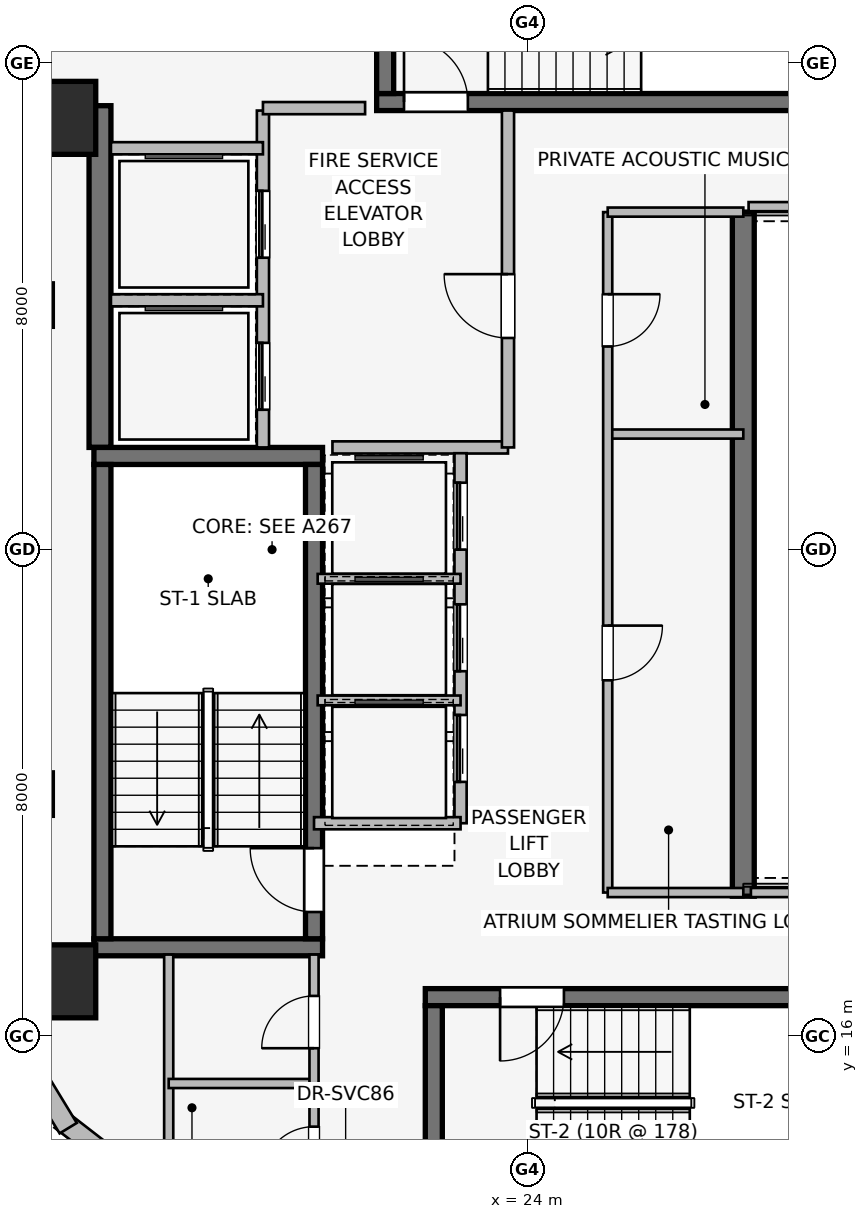
"""IFC4 building model, lengths in metres.
Left out: names, types, materials, properties, quantities, classifications, styles, units other than length and angle.
Written with IfcOpenShell. Run it as: python <this file> out.ifc"""

import sys

from ifc_helpers import new_model, si_unit, direction, frame, frame_2d, origin, origin_2d, place, context, subcontext, project, spatial, rectangle, extrude, element, fill, save


model = new_model("IFC4")
c1 = context("Model", 3, precision=1e-05, world=origin(), true_north=direction((0.0, 1.0)))
c2 = subcontext(c1, "Body", "Model", "MODEL_VIEW")
j1 = project(units=[si_unit("LENGTHUNIT", "METRE"), si_unit("PLANEANGLEUNIT", "RADIAN")], contexts=[c1])
p1 = place(None, origin())
s1 = spatial("IfcSite", under=j1, at=p1, CompositionType="ELEMENT")
p2 = place(p1, origin())
s2 = spatial("IfcBuilding", under=s1, at=p2, CompositionType="ELEMENT")
p3 = place(p2, frame((0.0, 0.0, 238.35)))
s3 = spatial("IfcBuildingStorey", under=s2, at=p3, CompositionType="ELEMENT", Elevation=238.35)
p4 = place(p3, frame((16.97, 25.68, 0.0), z_axis=(0.0, 0.0, 1.0), x_axis=(0.0, 1.0, 0.0)))
e1 = element("IfcWall", 1, at=p4, inside=s3, PredefinedType="SHEAR", context=c2, shape_type="SweptSolid", body=[
    extrude(rectangle(XDim=5.62, YDim=0.36, at=frame_2d((2.81, 0.0))), origin(), (0.0, 0.0, 1.0), 3.55),
])
p5 = place(p3, frame((27.55, 29.55, 0.0), z_axis=(0.0, 0.0, 1.0), x_axis=(0.0, -1.0, 0.0)))
e2 = element("IfcWall", 2, at=p5, inside=s3, PredefinedType="SHEAR", context=c2, shape_type="SweptSolid", body=[
    extrude(rectangle(XDim=11.25, YDim=0.36, at=frame_2d((5.625, 0.0))), origin(), (0.0, 0.0, 1.0), 3.55),
])
for number, where, z_axis, x_axis in (
    (3, (16.87, 17.46, 0.0), (0.0, 0.0, 1.0), (1.0, 0.0, 0.0)),
    (4, (20.63, 25.54, 0.0), (0.0, 0.0, 1.0), (-1.0, 0.0, 0.0)),
):
    element("IfcWall", number, at=place(p3, frame(where, z_axis=z_axis, x_axis=x_axis)), inside=s3, PredefinedType="SHEAR", context=c2, shape_type="SweptSolid", body=[
        extrude(rectangle(XDim=3.76, YDim=0.28, at=frame_2d((1.88, 0.0))), origin(), (0.0, 0.0, 1.0), 3.55),
    ])
p6 = place(p3, frame((17.01, 25.4, 0.0), z_axis=(0.0, 0.0, 1.0), x_axis=(0.0, -1.0, 0.0)))
e5 = element("IfcWall", 5, at=p6, inside=s3, PredefinedType="SHEAR", context=c2, shape_type="SweptSolid", body=[
    extrude(rectangle(XDim=7.8, YDim=0.28, at=frame_2d((3.9, 0.0))), origin(), (0.0, 0.0, 1.0), 3.55),
])
p7 = place(p3, frame((20.49, 17.6, 0.0), z_axis=(0.0, 0.0, 1.0), x_axis=(0.0, 1.0, 0.0)))
e6 = element("IfcWall", 6, at=p7, inside=s3, PredefinedType="SHEAR", context=c2, shape_type="SweptSolid", body=[
    extrude(rectangle(XDim=7.8, YDim=0.28, at=frame_2d((3.9, 0.0))), origin(), (0.0, 0.0, 1.0), 3.55),
])
p8 = place(p7, frame((0.44, 0.0, 0.0)))
e7 = element("IfcOpeningElement", 7, at=p8, cuts=e6, PredefinedType="OPENING", context=c2, shape_type="SweptSolid", body=[
    extrude(rectangle(XDim=1.05, YDim=2.0, at=frame_2d((0.525, 1.0))), frame((0.0, 0.15, 0.0), z_axis=(0.0, -1.0, 0.0), x_axis=(1.0, 0.0, 0.0)), (0.0, 0.0, 1.0), 0.3),
])
p9 = place(p3, frame((30.68, 16.64, 0.0), z_axis=(0.0, 0.0, 1.0), x_axis=(-1.0, 0.0, 0.0)))
e8 = element("IfcWall", 8, at=p9, inside=s3, PredefinedType="SHEAR", context=c2, shape_type="SweptSolid", body=[
    extrude(rectangle(XDim=8.36, YDim=0.28, at=frame_2d((4.18, 0.0))), origin(), (0.0, 0.0, 1.0), 3.55),
])
p10 = place(p9, frame((6.08, 0.0, 0.0)))
e9 = element("IfcOpeningElement", 9, at=p10, cuts=e8, PredefinedType="OPENING", context=c2, shape_type="SweptSolid", body=[
    extrude(rectangle(XDim=1.05, YDim=2.0, at=frame_2d((0.525, 1.0))), frame((0.0, 0.15, 0.0), z_axis=(0.0, -1.0, 0.0), x_axis=(1.0, 0.0, 0.0)), (0.0, 0.0, 1.0), 0.3),
])
p11 = place(p3, frame((22.46, 16.5, 0.0), z_axis=(0.0, 0.0, 1.0), x_axis=(0.0, -1.0, 0.0)))
e10 = element("IfcWall", 10, at=p11, inside=s3, PredefinedType="SHEAR", context=c2, shape_type="SweptSolid", body=[
    extrude(rectangle(XDim=3.2, YDim=0.28, at=frame_2d((1.6, 0.0))), origin(), (0.0, 0.0, 1.0), 3.55),
])
p12 = place(p3, frame((21.52, 31.36, 0.0), z_axis=(0.0, 0.0, 1.0), x_axis=(1.0, 0.0, 0.0)))
e11 = element("IfcWall", 11, at=p12, inside=s3, PredefinedType="SHEAR", context=c2, shape_type="SweptSolid", body=[
    extrude(rectangle(XDim=8.36, YDim=0.28, at=frame_2d((4.18, 0.0))), origin(), (0.0, 0.0, 1.0), 3.55),
])
p13 = place(p12, frame((0.45, 0.0, 0.0)))
e12 = element("IfcOpeningElement", 12, at=p13, cuts=e11, PredefinedType="OPENING", context=c2, shape_type="SweptSolid", body=[
    extrude(rectangle(XDim=1.05, YDim=2.0, at=frame_2d((0.525, 1.0))), frame((0.0, 0.15, 0.0), z_axis=(0.0, -1.0, 0.0), x_axis=(1.0, 0.0, 0.0)), (0.0, 0.0, 1.0), 0.3),
])
p14 = place(p3, frame((21.66, 34.7, 0.0), z_axis=(0.0, 0.0, 1.0), x_axis=(0.0, -1.0, 0.0)))
e13 = element("IfcWall", 13, at=p14, inside=s3, PredefinedType="SHEAR", context=c2, shape_type="SweptSolid", body=[
    extrude(rectangle(XDim=3.2, YDim=0.28, at=frame_2d((1.6, 0.0))), origin(), (0.0, 0.0, 1.0), 3.55),
])
for number, where, z_axis, x_axis in (
    (14, (16.3, 16.9, 0.0), (0.0, 0.0, 1.0), (1.0, 0.0, 0.0)),
    (15, (16.3, 31.1, 0.0), (0.0, 0.0, 1.0), (1.0, 0.0, 0.0)),
):
    element("IfcColumn", number, at=place(p3, frame(where, z_axis=z_axis, x_axis=x_axis)), inside=s3, PredefinedType="COLUMN", context=c2, shape_type="SweptSolid", body=[
        extrude(rectangle(XDim=1.2, YDim=1.2, at=origin_2d()), origin(), (0.0, 0.0, 1.0), 3.55),
    ])
p15 = place(p3, frame((15.574, 32.082, 0.0), z_axis=(0.0, 0.0, 1.0), x_axis=(0.520325409202, 0.853968072318, 0.0)))
e16 = element("IfcWall", 16, at=p15, inside=s3, PredefinedType="STANDARD", context=c2, shape_type="SweptSolid", body=[
    extrude(rectangle(XDim=1.678, YDim=0.33, at=frame_2d((0.839, 0.0))), origin(), (0.0, 0.0, 1.0), 3.26),
])
p16 = place(p3, frame((17.647, 13.599, 0.0), z_axis=(0.0, 0.0, 1.0), x_axis=(-0.790691856293, 0.61221433207, 0.0)))
e17 = element("IfcWall", 17, at=p16, inside=s3, PredefinedType="STANDARD", context=c2, shape_type="SweptSolid", body=[
    extrude(rectangle(XDim=1.676, YDim=0.33, at=frame_2d((0.838, 0.0))), origin(), (0.0, 0.0, 1.0), 3.26),
])
p17 = place(p3, frame((16.447, 14.485, 0.0), z_axis=(0.0, 0.0, 1.0), x_axis=(-0.520325409202, 0.853968072318, 0.0)))
e18 = element("IfcWall", 18, at=p17, inside=s3, PredefinedType="STANDARD", context=c2, shape_type="SweptSolid", body=[
    extrude(rectangle(XDim=1.678, YDim=0.33, at=frame_2d((0.839, 0.0))), origin(), (0.0, 0.0, 1.0), 3.26),
])
p18 = place(p3, frame((19.65, 25.68, 0.0), z_axis=(0.0, 0.0, 1.0), x_axis=(0.0, 1.0, 0.0)))
e19 = element("IfcWall", 19, at=p18, inside=s3, PredefinedType="PARTITIONING", context=c2, shape_type="SweptSolid", body=[
    extrude(rectangle(XDim=5.54, YDim=0.2, at=frame_2d((2.77, 0.0))), origin(), (0.0, 0.0, 1.0), 3.26),
])
p19 = place(p18, frame((0.62, 0.0, 0.0)))
e20 = element("IfcOpeningElement", 20, at=p19, cuts=e19, PredefinedType="OPENING", context=c2, shape_type="SweptSolid", body=[
    extrude(rectangle(XDim=1.1, YDim=2.2, at=frame_2d((0.55, 1.1))), frame((0.0, 0.11, 0.0), z_axis=(0.0, -1.0, 0.0), x_axis=(1.0, 0.0, 0.0)), (0.0, 0.0, 1.0), 0.22),
])
p20 = place(p18, frame((3.12, 0.0, 0.0)))
e21 = element("IfcOpeningElement", 21, at=p20, cuts=e19, PredefinedType="OPENING", context=c2, shape_type="SweptSolid", body=[
    extrude(rectangle(XDim=1.1, YDim=2.2, at=frame_2d((0.55, 1.1))), frame((0.0, 0.11, 0.0), z_axis=(0.0, -1.0, 0.0), x_axis=(1.0, 0.0, 0.0)), (0.0, 0.0, 1.0), 0.22),
])
p21 = place(p3, frame((20.793, 25.68, 0.0), z_axis=(0.0, 0.0, 1.0), x_axis=(1.0, 0.0, 0.0)))
e22 = element("IfcWall", 22, at=p21, inside=s3, PredefinedType="PARTITIONING", context=c2, shape_type="SweptSolid", body=[
    extrude(rectangle(XDim=2.887, YDim=0.2, at=frame_2d((1.443, 0.0))), origin(), (0.0, 0.0, 1.0), 3.26),
])
p22 = place(p3, frame((23.68, 25.68, 0.0), z_axis=(0.0, 0.0, 1.0), x_axis=(0.0, 1.0, 0.0)))
e23 = element("IfcWall", 23, at=p22, inside=s3, PredefinedType="PARTITIONING", context=c2, shape_type="SweptSolid", body=[
    extrude(rectangle(XDim=5.54, YDim=0.2, at=frame_2d((2.77, 0.0))), origin(), (0.0, 0.0, 1.0), 3.26),
])
p23 = place(p22, frame((1.8, 0.0, 0.0)))
e24 = element("IfcOpeningElement", 24, at=p23, cuts=e23, PredefinedType="OPENING", context=c2, shape_type="SweptSolid", body=[
    extrude(rectangle(XDim=1.05, YDim=2.0, at=frame_2d((0.525, 1.0))), frame((0.0, 0.11, 0.0), z_axis=(0.0, -1.0, 0.0), x_axis=(1.0, 0.0, 0.0)), (0.0, 0.0, 1.0), 0.22),
])
p24 = place(p3, frame((21.33, 31.26, 0.0), z_axis=(0.0, 0.0, 1.0), x_axis=(-1.0, 0.0, 0.0)))
e25 = element("IfcWall", 25, at=p24, inside=s3, PredefinedType="PARTITIONING", context=c2, shape_type="SweptSolid", body=[
    extrude(rectangle(XDim=1.68, YDim=0.2, at=frame_2d((0.84, 0.0))), origin(), (0.0, 0.0, 1.0), 3.26),
])
p25 = place(p3, frame((17.15, 28.1, 0.0), z_axis=(0.0, 0.0, 1.0), x_axis=(1.0, 0.0, 0.0)))
e26 = element("IfcWall", 26, at=p25, inside=s3, PredefinedType="PARTITIONING", context=c2, shape_type="SweptSolid", body=[
    extrude(rectangle(XDim=2.5, YDim=0.2, at=frame_2d((1.25, 0.0))), origin(), (0.0, 0.0, 1.0), 3.26),
])
p26 = place(p3, frame((19.65, 30.6, 0.0), z_axis=(0.0, 0.0, 1.0), x_axis=(-1.0, 0.0, 0.0)))
e27 = element("IfcWall", 27, at=p26, inside=s3, PredefinedType="PARTITIONING", context=c2, shape_type="SweptSolid", body=[
    extrude(rectangle(XDim=2.5, YDim=0.2, at=frame_2d((1.25, 0.0))), origin(), (0.0, 0.0, 1.0), 2.16),
])
p27 = place(p3, frame((22.9, 19.5, 0.0), z_axis=(0.0, 0.0, 1.0), x_axis=(0.0, 1.0, 0.0)))
e28 = element("IfcWall", 28, at=p27, inside=s3, PredefinedType="PARTITIONING", context=c2, shape_type="SweptSolid", body=[
    extrude(rectangle(XDim=6.085, YDim=0.2, at=frame_2d((3.042, 0.0))), origin(), (0.0, 0.0, 1.0), 3.26),
])
p28 = place(p27, frame((0.68, 0.0, 0.0)))
e29 = element("IfcOpeningElement", 29, at=p28, cuts=e28, PredefinedType="OPENING", context=c2, shape_type="SweptSolid", body=[
    extrude(rectangle(XDim=1.1, YDim=2.2, at=frame_2d((0.55, 1.1))), frame((0.0, 0.11, 0.0), z_axis=(0.0, -1.0, 0.0), x_axis=(1.0, 0.0, 0.0)), (0.0, 0.0, 1.0), 0.22),
])
p29 = place(p27, frame((2.5, 0.0, 0.0)))
e30 = element("IfcOpeningElement", 30, at=p29, cuts=e28, PredefinedType="OPENING", context=c2, shape_type="SweptSolid", body=[
    extrude(rectangle(XDim=1.1, YDim=2.2, at=frame_2d((0.55, 1.1))), frame((0.0, 0.11, 0.0), z_axis=(0.0, -1.0, 0.0), x_axis=(1.0, 0.0, 0.0)), (0.0, 0.0, 1.0), 0.22),
])
p30 = place(p27, frame((4.5, 0.0, 0.0)))
e31 = element("IfcOpeningElement", 31, at=p30, cuts=e28, PredefinedType="OPENING", context=c2, shape_type="SweptSolid", body=[
    extrude(rectangle(XDim=1.1, YDim=2.2, at=frame_2d((0.55, 1.1))), frame((0.0, 0.11, 0.0), z_axis=(0.0, -1.0, 0.0), x_axis=(1.0, 0.0, 0.0)), (0.0, 0.0, 1.0), 0.22),
])
p31 = place(p3, frame((20.49, 19.5, 0.0), z_axis=(0.0, 0.0, 1.0), x_axis=(1.0, 0.0, 0.0)))
e32 = element("IfcWall", 32, at=p31, inside=s3, PredefinedType="PARTITIONING", context=c2, shape_type="SweptSolid", body=[
    extrude(rectangle(XDim=2.41, YDim=0.2, at=frame_2d((1.205, 0.0))), origin(), (0.0, 0.0, 1.0), 2.16),
])
for number, where, z_axis, x_axis in (
    (33, (20.55, 21.52, 0.0), (0.0, 0.0, 1.0), (1.0, 0.0, 0.0)),
    (34, (20.55, 23.52, 0.0), (0.0, 0.0, 1.0), (1.0, 0.0, 0.0)),
):
    element("IfcWall", number, at=place(p3, frame(where, z_axis=z_axis, x_axis=x_axis)), inside=s3, PredefinedType="PARTITIONING", context=c2, shape_type="SweptSolid", body=[
        extrude(rectangle(XDim=2.35, YDim=0.16, at=frame_2d((1.175, 0.0))), origin(), (0.0, 0.0, 1.0), 3.26),
    ])
p32 = place(p3, frame((25.32, 25.9, 0.0), z_axis=(0.0, 0.0, 1.0), x_axis=(1.0, 0.0, 0.0)))
e35 = element("IfcWall", 35, at=p32, inside=s3, PredefinedType="PARTITIONING", context=c2, shape_type="SweptSolid", body=[
    extrude(rectangle(XDim=2.23, YDim=0.15, at=frame_2d((1.115, 0.0))), origin(), (0.0, 0.0, 1.0), 3.26),
])
p33 = place(p3, frame((25.32, 29.55, 0.0), z_axis=(0.0, 0.0, 1.0), x_axis=(0.0, -1.0, 0.0)))
e36 = element("IfcWall", 36, at=p33, inside=s3, PredefinedType="PARTITIONING", context=c2, shape_type="SweptSolid", body=[
    extrude(rectangle(XDim=11.19, YDim=0.15, at=frame_2d((5.595, 0.0))), origin(), (0.0, 0.0, 1.0), 3.26),
])
p34 = place(p33, frame((1.35, 0.0, 0.0)))
e37 = element("IfcOpeningElement", 37, at=p34, cuts=e36, PredefinedType="OPENING", context=c2, shape_type="SweptSolid", body=[
    extrude(rectangle(XDim=0.86, YDim=2.0, at=frame_2d((0.43, 1.0))), frame((0.0, 0.085, 0.0), z_axis=(0.0, -1.0, 0.0), x_axis=(1.0, 0.0, 0.0)), (0.0, 0.0, 1.0), 0.17),
])
p35 = place(p33, frame((6.8, 0.0, 0.0)))
e38 = element("IfcOpeningElement", 38, at=p35, cuts=e36, PredefinedType="OPENING", context=c2, shape_type="SweptSolid", body=[
    extrude(rectangle(XDim=0.9, YDim=2.0, at=frame_2d((0.45, 1.0))), frame((0.0, 0.085, 0.0), z_axis=(0.0, -1.0, 0.0), x_axis=(1.0, 0.0, 0.0)), (0.0, 0.0, 1.0), 0.17),
])
p36 = place(p3, frame((25.32, 18.36, 0.0), z_axis=(0.0, 0.0, 1.0), x_axis=(1.0, 0.0, 0.0)))
e39 = element("IfcWall", 39, at=p36, inside=s3, PredefinedType="PARTITIONING", context=c2, shape_type="SweptSolid", body=[
    extrude(rectangle(XDim=2.23, YDim=0.15, at=frame_2d((1.115, 0.0))), origin(), (0.0, 0.0, 1.0), 3.26),
])
p37 = place(p3, frame((27.55, 29.55, 0.0), z_axis=(0.0, 0.0, 1.0), x_axis=(-1.0, 0.0, 0.0)))
e40 = element("IfcWall", 40, at=p37, inside=s3, PredefinedType="PARTITIONING", context=c2, shape_type="SweptSolid", body=[
    extrude(rectangle(XDim=2.23, YDim=0.15, at=frame_2d((1.115, 0.0))), origin(), (0.0, 0.0, 1.0), 2.16),
])
p38 = place(p3, frame((18.1, 17.34, 0.0), z_axis=(0.0, 0.0, 1.0), x_axis=(0.0, -1.0, 0.0)))
e41 = element("IfcWall", 41, at=p38, inside=s3, PredefinedType="PARTITIONING", context=c2, shape_type="SweptSolid", body=[
    extrude(rectangle(XDim=4.133, YDim=0.15, at=frame_2d((2.066, 0.0))), origin(), (0.0, 0.0, 1.0), 3.26),
])
p39 = place(p3, frame((18.1, 15.22, 0.0), z_axis=(0.0, 0.0, 1.0), x_axis=(1.0, 0.0, 0.0)))
e42 = element("IfcWall", 42, at=p39, inside=s3, PredefinedType="PARTITIONING", context=c2, shape_type="SweptSolid", body=[
    extrude(rectangle(XDim=2.39, YDim=0.15, at=frame_2d((1.195, 0.0))), origin(), (0.0, 0.0, 1.0), 3.26),
])
p40 = place(p3, frame((20.49, 13.2, 0.0), z_axis=(0.0, 0.0, 1.0), x_axis=(0.0, 1.0, 0.0)))
e43 = element("IfcWall", 43, at=p40, inside=s3, PredefinedType="PARTITIONING", context=c2, shape_type="SweptSolid", body=[
    extrude(rectangle(XDim=4.14, YDim=0.15, at=frame_2d((2.07, 0.0))), origin(), (0.0, 0.0, 1.0), 3.26),
])
p41 = place(p40, frame((0.45, 0.0, 0.0)))
e44 = element("IfcOpeningElement", 44, at=p41, cuts=e43, PredefinedType="OPENING", context=c2, shape_type="SweptSolid", body=[
    extrude(rectangle(XDim=0.86, YDim=2.0, at=frame_2d((0.43, 1.0))), frame((0.0, 0.085, 0.0), z_axis=(0.0, -1.0, 0.0), x_axis=(1.0, 0.0, 0.0)), (0.0, 0.0, 1.0), 0.17),
])
p42 = place(p40, frame((2.6, 0.0, 0.0)))
e45 = element("IfcOpeningElement", 45, at=p42, cuts=e43, PredefinedType="OPENING", context=c2, shape_type="SweptSolid", body=[
    extrude(rectangle(XDim=0.86, YDim=2.0, at=frame_2d((0.43, 1.0))), frame((0.0, 0.085, 0.0), z_axis=(0.0, -1.0, 0.0), x_axis=(1.0, 0.0, 0.0)), (0.0, 0.0, 1.0), 0.17),
])
p43 = place(p3, frame((27.675, 18.36, 0.0), z_axis=(0.0, 0.0, 1.0), x_axis=(1.0, 0.0, 0.0)))
e46 = element("IfcWall", 46, at=p43, inside=s3, PredefinedType="PARTITIONING", context=c2, shape_type="SweptSolid", body=[
    extrude(rectangle(XDim=12.165, YDim=0.15, at=frame_2d((6.083, 0.0))), origin(), (0.0, 0.0, 1.0), 2.401),
])
p44 = place(p3, frame((39.84, 29.64, 0.0), z_axis=(0.0, 0.0, 1.0), x_axis=(-1.0, 0.0, 0.0)))
e47 = element("IfcWall", 47, at=p44, inside=s3, PredefinedType="PARTITIONING", context=c2, shape_type="SweptSolid", body=[
    extrude(rectangle(XDim=12.203, YDim=0.15, at=frame_2d((6.102, 0.0))), origin(), (0.0, 0.0, 1.0), 2.401),
])
p45 = place(p8, origin())
e48 = element("IfcDoor", 48, at=p45, inside=s3, OperationType="SINGLE_SWING_RIGHT", PredefinedType="DOOR", context=c2, shape_type="SweptSolid", body=[
    extrude(rectangle(XDim=1.05, YDim=2.0, at=frame_2d((0.525, 1.0))), frame((0.0, 0.025, 0.0), z_axis=(0.0, -1.0, 0.0), x_axis=(1.0, 0.0, 0.0)), (0.0, 0.0, 1.0), 0.05),
])
fill(e7, e48)
p46 = place(p10, origin())
e49 = element("IfcDoor", 49, at=p46, inside=s3, OperationType="SINGLE_SWING_RIGHT", PredefinedType="DOOR", context=c2, shape_type="SweptSolid", body=[
    extrude(rectangle(XDim=1.05, YDim=2.0, at=frame_2d((0.525, 1.0))), frame((0.0, 0.025, 0.0), z_axis=(0.0, -1.0, 0.0), x_axis=(1.0, 0.0, 0.0)), (0.0, 0.0, 1.0), 0.05),
])
fill(e9, e49)
p47 = place(p13, origin())
e50 = element("IfcDoor", 50, at=p47, inside=s3, OperationType="SINGLE_SWING_LEFT", PredefinedType="DOOR", context=c2, shape_type="SweptSolid", body=[
    extrude(rectangle(XDim=1.05, YDim=2.0, at=frame_2d((0.525, 1.0))), frame((0.0, 0.025, 0.0), z_axis=(0.0, -1.0, 0.0), x_axis=(1.0, 0.0, 0.0)), (0.0, 0.0, 1.0), 0.05),
])
fill(e12, e50)
p48 = place(p19, origin())
e51 = element("IfcDoor", 51, at=p48, inside=s3, OperationType="SLIDING_TO_LEFT", PredefinedType="DOOR", context=c2, shape_type="SweptSolid", body=[
    extrude(rectangle(XDim=1.1, YDim=2.2, at=frame_2d((0.55, 1.1))), frame((0.0, 0.025, 0.0), z_axis=(0.0, -1.0, 0.0), x_axis=(1.0, 0.0, 0.0)), (0.0, 0.0, 1.0), 0.05),
])
fill(e20, e51)
p49 = place(p20, origin())
e52 = element("IfcDoor", 52, at=p49, inside=s3, OperationType="SLIDING_TO_LEFT", PredefinedType="DOOR", context=c2, shape_type="SweptSolid", body=[
    extrude(rectangle(XDim=1.1, YDim=2.2, at=frame_2d((0.55, 1.1))), frame((0.0, 0.025, 0.0), z_axis=(0.0, -1.0, 0.0), x_axis=(1.0, 0.0, 0.0)), (0.0, 0.0, 1.0), 0.05),
])
fill(e21, e52)
p50 = place(p23, origin())
e53 = element("IfcDoor", 53, at=p50, inside=s3, OperationType="SINGLE_SWING_RIGHT", PredefinedType="DOOR", context=c2, shape_type="SweptSolid", body=[
    extrude(rectangle(XDim=1.05, YDim=2.0, at=frame_2d((0.525, 1.0))), frame((0.0, 0.025, 0.0), z_axis=(0.0, -1.0, 0.0), x_axis=(1.0, 0.0, 0.0)), (0.0, 0.0, 1.0), 0.05),
])
fill(e24, e53)
p51 = place(p28, origin())
e54 = element("IfcDoor", 54, at=p51, inside=s3, OperationType="SLIDING_TO_LEFT", PredefinedType="DOOR", context=c2, shape_type="SweptSolid", body=[
    extrude(rectangle(XDim=1.1, YDim=2.2, at=frame_2d((0.55, 1.1))), frame((0.0, 0.025, 0.0), z_axis=(0.0, -1.0, 0.0), x_axis=(1.0, 0.0, 0.0)), (0.0, 0.0, 1.0), 0.05),
])
fill(e29, e54)
p52 = place(p29, origin())
e55 = element("IfcDoor", 55, at=p52, inside=s3, OperationType="SLIDING_TO_LEFT", PredefinedType="DOOR", context=c2, shape_type="SweptSolid", body=[
    extrude(rectangle(XDim=1.1, YDim=2.2, at=frame_2d((0.55, 1.1))), frame((0.0, 0.025, 0.0), z_axis=(0.0, -1.0, 0.0), x_axis=(1.0, 0.0, 0.0)), (0.0, 0.0, 1.0), 0.05),
])
fill(e30, e55)
p53 = place(p30, origin())
e56 = element("IfcDoor", 56, at=p53, inside=s3, OperationType="SLIDING_TO_LEFT", PredefinedType="DOOR", context=c2, shape_type="SweptSolid", body=[
    extrude(rectangle(XDim=1.1, YDim=2.2, at=frame_2d((0.55, 1.1))), frame((0.0, 0.025, 0.0), z_axis=(0.0, -1.0, 0.0), x_axis=(1.0, 0.0, 0.0)), (0.0, 0.0, 1.0), 0.05),
])
fill(e31, e56)
p54 = place(p34, origin())
e57 = element("IfcDoor", 57, at=p54, inside=s3, OperationType="SINGLE_SWING_LEFT", PredefinedType="DOOR", context=c2, shape_type="SweptSolid", body=[
    extrude(rectangle(XDim=0.86, YDim=2.0, at=frame_2d((0.43, 1.0))), frame((0.0, 0.025, 0.0), z_axis=(0.0, -1.0, 0.0), x_axis=(1.0, 0.0, 0.0)), (0.0, 0.0, 1.0), 0.05),
])
fill(e37, e57)
p55 = place(p35, origin())
e58 = element("IfcDoor", 58, at=p55, inside=s3, OperationType="SINGLE_SWING_LEFT", PredefinedType="DOOR", context=c2, shape_type="SweptSolid", body=[
    extrude(rectangle(XDim=0.9, YDim=2.0, at=frame_2d((0.45, 1.0))), frame((0.0, 0.025, 0.0), z_axis=(0.0, -1.0, 0.0), x_axis=(1.0, 0.0, 0.0)), (0.0, 0.0, 1.0), 0.05),
])
fill(e38, e58)
p56 = place(p41, origin())
e59 = element("IfcDoor", 59, at=p56, inside=s3, OperationType="SINGLE_SWING_LEFT", PredefinedType="DOOR", context=c2, shape_type="SweptSolid", body=[
    extrude(rectangle(XDim=0.86, YDim=2.0, at=frame_2d((0.43, 1.0))), frame((0.0, 0.025, 0.0), z_axis=(0.0, -1.0, 0.0), x_axis=(1.0, 0.0, 0.0)), (0.0, 0.0, 1.0), 0.05),
])
fill(e44, e59)
p57 = place(p42, origin())
e60 = element("IfcDoor", 60, at=p57, inside=s3, OperationType="SINGLE_SWING_LEFT", PredefinedType="DOOR", context=c2, shape_type="SweptSolid", body=[
    extrude(rectangle(XDim=0.86, YDim=2.0, at=frame_2d((0.43, 1.0))), frame((0.0, 0.025, 0.0), z_axis=(0.0, -1.0, 0.0), x_axis=(1.0, 0.0, 0.0)), (0.0, 0.0, 1.0), 0.05),
])
fill(e45, e60)
save(model, sys.argv[1])
